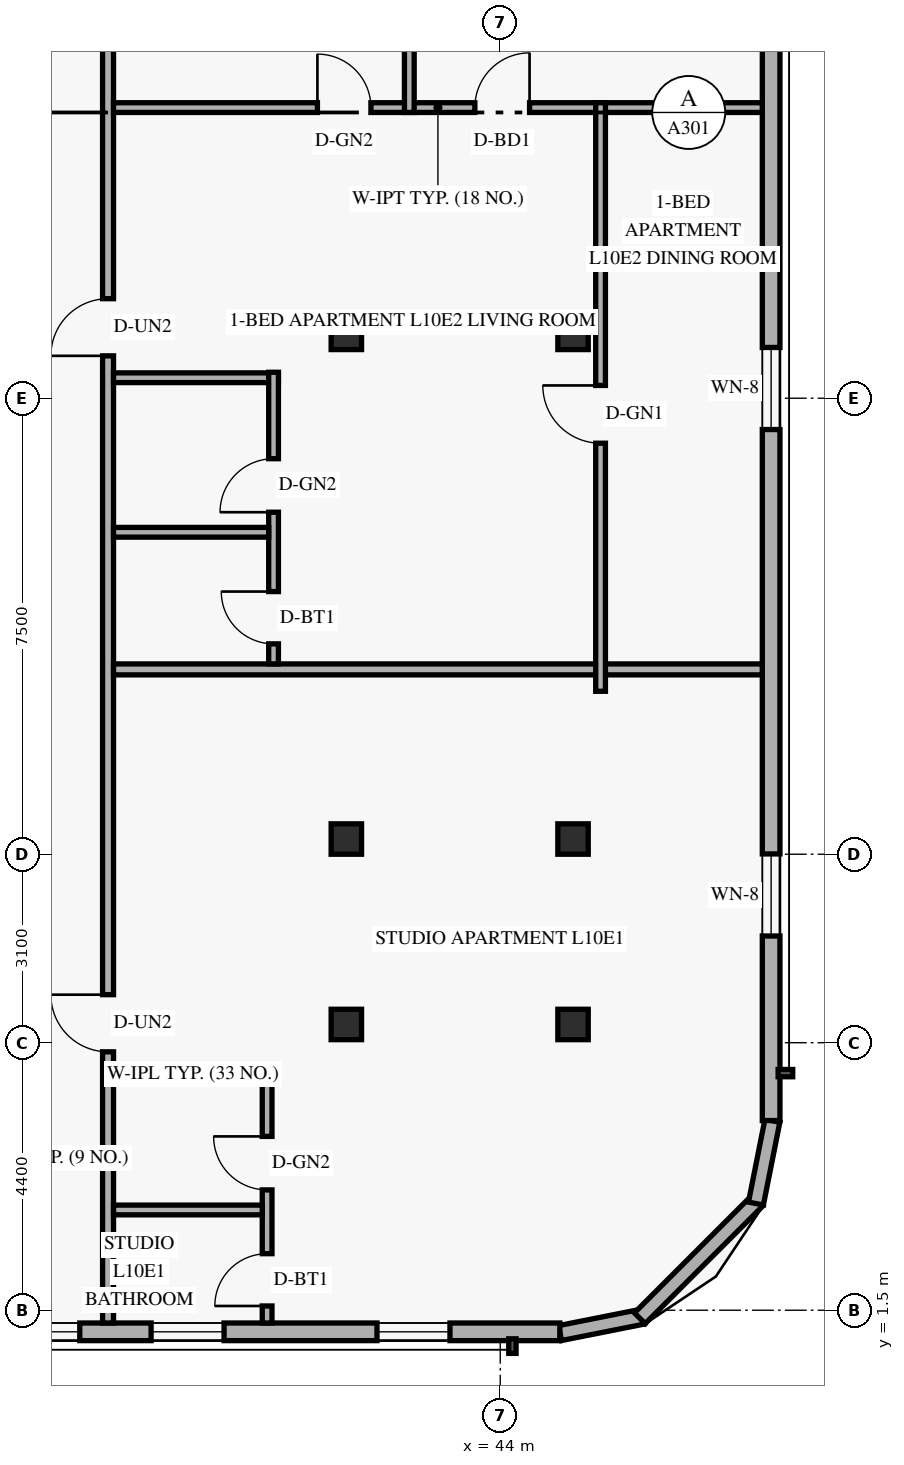
"""IFC4 building model, lengths in metres.
Left out: names, types, materials, properties, quantities, classifications, styles, units other than length and angle.
Written with IfcOpenShell. Run it as: python <this file> out.ifc"""

import sys

from ifc_helpers import new_model, si_unit, direction, frame, frame_2d, origin, origin_2d, place, context, subcontext, project, spatial, rectangle, hollow_rectangle, extrude, element, fill, save


model = new_model("IFC4")
c1 = context("Model", 3, precision=1e-05, world=origin(), true_north=direction((0.0, 1.0)))
c2 = subcontext(c1, "Body", "Model", "MODEL_VIEW")
j1 = project(units=[si_unit("LENGTHUNIT", "METRE"), si_unit("PLANEANGLEUNIT", "RADIAN")], contexts=[c1])
p1 = place(None, origin())
s1 = spatial("IfcSite", under=j1, at=p1, CompositionType="ELEMENT")
p2 = place(p1, origin())
s2 = spatial("IfcBuilding", under=s1, at=p2, CompositionType="ELEMENT")
p3 = place(p2, frame((0.0, 0.0, 42.0)))
s3 = spatial("IfcBuildingStorey", under=s2, at=p3, CompositionType="ELEMENT", Elevation=42.0)
for number, where, z_axis, x_axis in (
    (1, (41.406, 6.2, 0.0), (0.035, 0.0, 0.999), (0.0, 1.0, 0.0)),
    (2, (41.406, 9.25, 0.0), (0.035, 0.0, 0.999), (0.0, 1.0, 0.0)),
    (3, (41.406, 17.55, 0.0), (0.035, 0.0, 0.999), (0.0, 1.0, 0.0)),
):
    element("IfcColumn", number, at=place(p3, frame(where, z_axis=z_axis, x_axis=x_axis)), inside=s3, PredefinedType="COLUMN", context=c2, shape_type="SweptSolid", body=[
        extrude(hollow_rectangle(XDim=0.5, YDim=0.5, WallThickness=0.022, at=origin_2d()), origin(), (0.0, 0.0, 1.0), 3.602),
    ])
for number, where, z_axis, x_axis in (
    (4, (45.093, 6.2, 0.0), (0.058, 0.0, 0.998), (0.0, 1.0, 0.0)),
    (5, (45.093, 9.25, 0.0), (0.058, 0.0, 0.998), (0.0, 1.0, 0.0)),
    (6, (45.093, 17.55, 0.0), (0.058, 0.0, 0.998), (0.0, 1.0, 0.0)),
):
    element("IfcColumn", number, at=place(p3, frame(where, z_axis=z_axis, x_axis=x_axis)), inside=s3, PredefinedType="COLUMN", context=c2, shape_type="SweptSolid", body=[
        extrude(hollow_rectangle(XDim=0.5, YDim=0.5, WallThickness=0.022, at=origin_2d()), origin(), (0.0, 0.0, 1.0), 3.606),
    ])
p4 = place(p3, frame((44.983, 1.124, 0.0), z_axis=(0.0, 0.0, 1.0), x_axis=(0.980809899341, 0.19496651342, 0.0)))
e7 = element("IfcWall", 7, at=p4, inside=s3, PredefinedType="SOLIDWALL", context=c2, shape_type="SweptSolid", body=[
    extrude(rectangle(XDim=1.389, YDim=0.25, at=frame_2d((0.694, 0.0))), origin(), (0.0, 0.0, 1.0), 3.36),
])
p5 = place(p3, frame((46.295, 1.368, 0.0), z_axis=(0.0, 0.0, 1.0), x_axis=(0.707106781187, 0.707106781187, 0.0)))
e8 = element("IfcWall", 8, at=p5, inside=s3, PredefinedType="SOLIDWALL", context=c2, shape_type="SweptSolid", body=[
    extrude(rectangle(XDim=2.739, YDim=0.25, at=frame_2d((1.37, 0.0))), origin(), (0.0, 0.0, 1.0), 3.36),
])
p6 = place(p3, frame((48.205, 3.254, 0.0), z_axis=(0.0, 0.0, 1.0), x_axis=(0.19496651342, 0.980809899341, 0.0)))
e9 = element("IfcWall", 9, at=p6, inside=s3, PredefinedType="SOLIDWALL", context=c2, shape_type="SweptSolid", body=[
    extrude(rectangle(XDim=1.389, YDim=0.25, at=frame_2d((0.694, 0.0))), origin(), (0.0, 0.0, 1.0), 3.36),
])
p7 = place(p3, frame((5.42, 1.145, 0.0), z_axis=(0.0, 0.0, 1.0), x_axis=(1.0, 0.0, 0.0)))
e10 = element("IfcWall", 10, at=p7, inside=s3, PredefinedType="SOLIDWALL", context=c2, shape_type="SweptSolid", body=[
    extrude(rectangle(XDim=39.56, YDim=0.29, at=frame_2d((19.78, 0.0))), origin(), (0.0, 0.0, 1.0), 3.36),
])
p8 = place(p7, frame((2.84, 0.0, 0.85)))
e11 = element("IfcOpeningElement", 11, at=p8, cuts=e10, PredefinedType="OPENING", context=c2, shape_type="SweptSolid", body=[
    extrude(rectangle(XDim=1.2, YDim=1.5, at=frame_2d((0.6, 0.75))), frame((0.0, 0.155, 0.0), z_axis=(0.0, -1.0, 0.0), x_axis=(1.0, 0.0, 0.0)), (0.0, 0.0, 1.0), 0.31),
])
p9 = place(p7, frame((7.18, 0.0, 0.85)))
e12 = element("IfcOpeningElement", 12, at=p9, cuts=e10, PredefinedType="OPENING", context=c2, shape_type="SweptSolid", body=[
    extrude(rectangle(XDim=1.2, YDim=1.5, at=frame_2d((0.6, 0.75))), frame((0.0, 0.155, 0.0), z_axis=(0.0, -1.0, 0.0), x_axis=(1.0, 0.0, 0.0)), (0.0, 0.0, 1.0), 0.31),
])
p10 = place(p7, frame((12.131, 0.0, 0.85)))
e13 = element("IfcOpeningElement", 13, at=p10, cuts=e10, PredefinedType="OPENING", context=c2, shape_type="SweptSolid", body=[
    extrude(rectangle(XDim=1.2, YDim=1.5, at=frame_2d((0.6, 0.75))), frame((0.0, 0.155, 0.0), z_axis=(0.0, -1.0, 0.0), x_axis=(1.0, 0.0, 0.0)), (0.0, 0.0, 1.0), 0.31),
])
p11 = place(p7, frame((18.74, 0.0, 0.85)))
e14 = element("IfcOpeningElement", 14, at=p11, cuts=e10, PredefinedType="OPENING", context=c2, shape_type="SweptSolid", body=[
    extrude(rectangle(XDim=1.2, YDim=1.5, at=frame_2d((0.6, 0.75))), frame((0.0, 0.155, 0.0), z_axis=(0.0, -1.0, 0.0), x_axis=(1.0, 0.0, 0.0)), (0.0, 0.0, 1.0), 0.31),
])
p12 = place(p7, frame((25.349, 0.0, 0.85)))
e15 = element("IfcOpeningElement", 15, at=p12, cuts=e10, PredefinedType="OPENING", context=c2, shape_type="SweptSolid", body=[
    extrude(rectangle(XDim=1.2, YDim=1.5, at=frame_2d((0.6, 0.75))), frame((0.0, 0.155, 0.0), z_axis=(0.0, -1.0, 0.0), x_axis=(1.0, 0.0, 0.0)), (0.0, 0.0, 1.0), 0.31),
])
p13 = place(p7, frame((30.465, 0.0, 0.85)))
e16 = element("IfcOpeningElement", 16, at=p13, cuts=e10, PredefinedType="OPENING", context=c2, shape_type="SweptSolid", body=[
    extrude(rectangle(XDim=1.2, YDim=1.5, at=frame_2d((0.6, 0.75))), frame((0.0, 0.155, 0.0), z_axis=(0.0, -1.0, 0.0), x_axis=(1.0, 0.0, 0.0)), (0.0, 0.0, 1.0), 0.31),
])
p14 = place(p7, frame((32.838, 0.0, 0.85)))
e17 = element("IfcOpeningElement", 17, at=p14, cuts=e10, PredefinedType="OPENING", context=c2, shape_type="SweptSolid", body=[
    extrude(rectangle(XDim=1.2, YDim=1.5, at=frame_2d((0.6, 0.75))), frame((0.0, 0.155, 0.0), z_axis=(0.0, -1.0, 0.0), x_axis=(1.0, 0.0, 0.0)), (0.0, 0.0, 1.0), 0.31),
])
p15 = place(p7, frame((36.553, 0.0, 0.85)))
e18 = element("IfcOpeningElement", 18, at=p15, cuts=e10, PredefinedType="OPENING", context=c2, shape_type="SweptSolid", body=[
    extrude(rectangle(XDim=1.2, YDim=1.5, at=frame_2d((0.6, 0.75))), frame((0.0, 0.155, 0.0), z_axis=(0.0, -1.0, 0.0), x_axis=(1.0, 0.0, 0.0)), (0.0, 0.0, 1.0), 0.31),
])
p16 = place(p3, frame((48.455, 4.62, 0.0), z_axis=(0.0, 0.0, 1.0), x_axis=(0.0, 1.0, 0.0)))
e19 = element("IfcWall", 19, at=p16, inside=s3, PredefinedType="SOLIDWALL", context=c2, shape_type="SweptSolid", body=[
    extrude(rectangle(XDim=38.76, YDim=0.29, at=frame_2d((19.38, 0.0))), origin(), (0.0, 0.0, 1.0), 3.36),
])
p17 = place(p16, frame((3.035, 0.0, 0.85)))
e20 = element("IfcOpeningElement", 20, at=p17, cuts=e19, PredefinedType="OPENING", context=c2, shape_type="SweptSolid", body=[
    extrude(rectangle(XDim=1.35, YDim=1.55, at=frame_2d((0.675, 0.775))), frame((0.0, 0.155, 0.0), z_axis=(0.0, -1.0, 0.0), x_axis=(1.0, 0.0, 0.0)), (0.0, 0.0, 1.0), 0.31),
])
p18 = place(p16, frame((11.365, 0.0, 0.85)))
e21 = element("IfcOpeningElement", 21, at=p18, cuts=e19, PredefinedType="OPENING", context=c2, shape_type="SweptSolid", body=[
    extrude(rectangle(XDim=1.35, YDim=1.55, at=frame_2d((0.675, 0.775))), frame((0.0, 0.155, 0.0), z_axis=(0.0, -1.0, 0.0), x_axis=(1.0, 0.0, 0.0)), (0.0, 0.0, 1.0), 0.31),
])
p19 = place(p16, frame((17.805, 0.0, 0.85)))
e22 = element("IfcOpeningElement", 22, at=p19, cuts=e19, PredefinedType="OPENING", context=c2, shape_type="SweptSolid", body=[
    extrude(rectangle(XDim=1.35, YDim=1.55, at=frame_2d((0.675, 0.775))), frame((0.0, 0.155, 0.0), z_axis=(0.0, -1.0, 0.0), x_axis=(1.0, 0.0, 0.0)), (0.0, 0.0, 1.0), 0.31),
])
p20 = place(p16, frame((23.61, 0.0, 0.85)))
e23 = element("IfcOpeningElement", 23, at=p20, cuts=e19, PredefinedType="OPENING", context=c2, shape_type="SweptSolid", body=[
    extrude(rectangle(XDim=1.35, YDim=1.55, at=frame_2d((0.675, 0.775))), frame((0.0, 0.155, 0.0), z_axis=(0.0, -1.0, 0.0), x_axis=(1.0, 0.0, 0.0)), (0.0, 0.0, 1.0), 0.31),
])
p21 = place(p16, frame((29.59, 0.0, 0.85)))
e24 = element("IfcOpeningElement", 24, at=p21, cuts=e19, PredefinedType="OPENING", context=c2, shape_type="SweptSolid", body=[
    extrude(rectangle(XDim=1.35, YDim=1.55, at=frame_2d((0.675, 0.775))), frame((0.0, 0.155, 0.0), z_axis=(0.0, -1.0, 0.0), x_axis=(1.0, 0.0, 0.0)), (0.0, 0.0, 1.0), 0.31),
])
p22 = place(p16, frame((34.835, 0.0, 0.85)))
e25 = element("IfcOpeningElement", 25, at=p22, cuts=e19, PredefinedType="OPENING", context=c2, shape_type="SweptSolid", body=[
    extrude(rectangle(XDim=1.35, YDim=1.55, at=frame_2d((0.675, 0.775))), frame((0.0, 0.155, 0.0), z_axis=(0.0, -1.0, 0.0), x_axis=(1.0, 0.0, 0.0)), (0.0, 0.0, 1.0), 0.31),
])
p23 = place(p3, frame((37.55, 1.29, 0.0), z_axis=(0.0, 0.0, 1.0), x_axis=(0.0, 1.0, 0.0)))
e26 = element("IfcWall", 26, at=p23, inside=s3, PredefinedType="STANDARD", context=c2, shape_type="SweptSolid", body=[
    extrude(rectangle(XDim=45.42, YDim=0.18, at=frame_2d((22.71, 0.0))), origin(), (0.0, 0.0, 1.0), 2.649),
])
p24 = place(p23, frame((4.46, 0.0, 0.0)))
e27 = element("IfcOpeningElement", 27, at=p24, cuts=e26, PredefinedType="OPENING", context=c2, shape_type="SweptSolid", body=[
    extrude(rectangle(XDim=0.94, YDim=2.15, at=frame_2d((0.47, 1.075))), frame((0.0, 0.1, 0.0), z_axis=(0.0, -1.0, 0.0), x_axis=(1.0, 0.0, 0.0)), (0.0, 0.0, 1.0), 0.2),
])
p25 = place(p23, frame((15.907, 0.0, 0.0)))
e28 = element("IfcOpeningElement", 28, at=p25, cuts=e26, PredefinedType="OPENING", context=c2, shape_type="SweptSolid", body=[
    extrude(rectangle(XDim=0.94, YDim=2.15, at=frame_2d((0.47, 1.075))), frame((0.0, 0.1, 0.0), z_axis=(0.0, -1.0, 0.0), x_axis=(1.0, 0.0, 0.0)), (0.0, 0.0, 1.0), 0.2),
])
p26 = place(p23, frame((28.23, 0.0, 0.0)))
e29 = element("IfcOpeningElement", 29, at=p26, cuts=e26, PredefinedType="OPENING", context=c2, shape_type="SweptSolid", body=[
    extrude(rectangle(XDim=0.94, YDim=2.15, at=frame_2d((0.47, 1.075))), frame((0.0, 0.1, 0.0), z_axis=(0.0, -1.0, 0.0), x_axis=(1.0, 0.0, 0.0)), (0.0, 0.0, 1.0), 0.2),
])
p27 = place(p23, frame((40.02, 0.0, 0.0)))
e30 = element("IfcOpeningElement", 30, at=p27, cuts=e26, PredefinedType="OPENING", context=c2, shape_type="SweptSolid", body=[
    extrude(rectangle(XDim=0.94, YDim=2.15, at=frame_2d((0.47, 1.075))), frame((0.0, 0.1, 0.0), z_axis=(0.0, -1.0, 0.0), x_axis=(1.0, 0.0, 0.0)), (0.0, 0.0, 1.0), 0.2),
])
p28 = place(p3, frame((37.64, 5.39, 0.0), z_axis=(0.0, 0.0, 1.0), x_axis=(1.0, 0.0, 0.0)))
e31 = element("IfcWall", 31, at=p28, inside=s3, PredefinedType="PLUMBINGWALL", context=c2, shape_type="SweptSolid", body=[
    extrude(rectangle(XDim=2.606, YDim=0.16, at=frame_2d((1.303, 0.0))), origin(), (0.0, 0.0, 1.0), 3.36),
])
p29 = place(p3, frame((40.166, 1.29, 0.0), z_axis=(0.0, 0.0, 1.0), x_axis=(0.0, 1.0, 0.0)))
e32 = element("IfcWall", 32, at=p29, inside=s3, PredefinedType="PLUMBINGWALL", context=c2, shape_type="SweptSolid", body=[
    extrude(rectangle(XDim=4.19, YDim=0.16, at=frame_2d((2.095, 0.0))), origin(), (0.0, 0.0, 1.0), 3.36),
])
p30 = place(p29, frame((0.28, 0.0, 0.0)))
e33 = element("IfcOpeningElement", 33, at=p30, cuts=e32, PredefinedType="OPENING", context=c2, shape_type="SweptSolid", body=[
    extrude(rectangle(XDim=0.86, YDim=2.12, at=frame_2d((0.43, 1.06))), frame((0.0, 0.09, 0.0), z_axis=(0.0, -1.0, 0.0), x_axis=(1.0, 0.0, 0.0)), (0.0, 0.0, 1.0), 0.18),
])
p31 = place(p29, frame((2.189, 0.0, 0.0)))
e34 = element("IfcOpeningElement", 34, at=p31, cuts=e32, PredefinedType="OPENING", context=c2, shape_type="SweptSolid", body=[
    extrude(rectangle(XDim=0.88, YDim=2.12, at=frame_2d((0.44, 1.06))), frame((0.0, 0.09, 0.0), z_axis=(0.0, -1.0, 0.0), x_axis=(1.0, 0.0, 0.0)), (0.0, 0.0, 1.0), 0.18),
])
p32 = place(p3, frame((37.64, 3.149, 0.0), z_axis=(0.0, 0.0, 1.0), x_axis=(1.0, 0.0, 0.0)))
e35 = element("IfcWall", 35, at=p32, inside=s3, PredefinedType="PLUMBINGWALL", context=c2, shape_type="SweptSolid", body=[
    extrude(rectangle(XDim=2.446, YDim=0.16, at=frame_2d((1.223, 0.0))), origin(), (0.0, 0.0, 1.0), 3.36),
])
p33 = place(p3, frame((37.64, 12.04, 0.0), z_axis=(0.0, 0.0, 1.0), x_axis=(1.0, 0.0, 0.0)))
e36 = element("IfcWall", 36, at=p33, inside=s3, PredefinedType="PARTITIONING", context=c2, shape_type="SweptSolid", body=[
    extrude(rectangle(XDim=10.67, YDim=0.18, at=frame_2d((5.335, 0.0))), origin(), (0.0, 0.0, 1.0), 2.649),
])
p34 = place(p3, frame((37.64, 21.28, 0.0), z_axis=(0.0, 0.0, 1.0), x_axis=(1.0, 0.0, 0.0)))
e37 = element("IfcWall", 37, at=p34, inside=s3, PredefinedType="PARTITIONING", context=c2, shape_type="SweptSolid", body=[
    extrude(rectangle(XDim=10.67, YDim=0.16, at=frame_2d((5.335, 0.0))), origin(), (0.0, 0.0, 1.0), 2.649),
])
p35 = place(p34, frame((3.353, 0.0, 0.0)))
e38 = element("IfcOpeningElement", 38, at=p35, cuts=e37, PredefinedType="OPENING", context=c2, shape_type="SweptSolid", body=[
    extrude(rectangle(XDim=0.88, YDim=2.12, at=frame_2d((0.44, 1.06))), frame((0.0, 0.09, 0.0), z_axis=(0.0, -1.0, 0.0), x_axis=(1.0, 0.0, 0.0)), (0.0, 0.0, 1.0), 0.18),
])
p36 = place(p34, frame((5.942, 0.0, 0.0)))
e39 = element("IfcOpeningElement", 39, at=p36, cuts=e37, PredefinedType="OPENING", context=c2, shape_type="SweptSolid", body=[
    extrude(rectangle(XDim=0.9, YDim=2.14, at=frame_2d((0.45, 1.07))), frame((0.0, 0.09, 0.0), z_axis=(0.0, -1.0, 0.0), x_axis=(1.0, 0.0, 0.0)), (0.0, 0.0, 1.0), 0.18),
])
p37 = place(p3, frame((37.64, 16.837, 0.0), z_axis=(0.0, 0.0, 1.0), x_axis=(1.0, 0.0, 0.0)))
e40 = element("IfcWall", 40, at=p37, inside=s3, PredefinedType="PLUMBINGWALL", context=c2, shape_type="SweptSolid", body=[
    extrude(rectangle(XDim=2.712, YDim=0.16, at=frame_2d((1.356, 0.0))), origin(), (0.0, 0.0, 1.0), 3.36),
])
p38 = place(p3, frame((40.272, 12.13, 0.0), z_axis=(0.0, 0.0, 1.0), x_axis=(0.0, 1.0, 0.0)))
e41 = element("IfcWall", 41, at=p38, inside=s3, PredefinedType="PLUMBINGWALL", context=c2, shape_type="SweptSolid", body=[
    extrude(rectangle(XDim=4.797, YDim=0.16, at=frame_2d((2.398, 0.0))), origin(), (0.0, 0.0, 1.0), 2.932),
])
p39 = place(p38, frame((0.33, 0.0, 0.0)))
e42 = element("IfcOpeningElement", 42, at=p39, cuts=e41, PredefinedType="OPENING", context=c2, shape_type="SweptSolid", body=[
    extrude(rectangle(XDim=0.86, YDim=2.12, at=frame_2d((0.43, 1.06))), frame((0.0, 0.09, 0.0), z_axis=(0.0, -1.0, 0.0), x_axis=(1.0, 0.0, 0.0)), (0.0, 0.0, 1.0), 0.18),
])
p40 = place(p38, frame((2.495, 0.0, 0.0)))
e43 = element("IfcOpeningElement", 43, at=p40, cuts=e41, PredefinedType="OPENING", context=c2, shape_type="SweptSolid", body=[
    extrude(rectangle(XDim=0.88, YDim=2.12, at=frame_2d((0.44, 1.06))), frame((0.0, 0.09, 0.0), z_axis=(0.0, -1.0, 0.0), x_axis=(1.0, 0.0, 0.0)), (0.0, 0.0, 1.0), 0.18),
])
p41 = place(p3, frame((37.64, 14.295, 0.0), z_axis=(0.0, 0.0, 1.0), x_axis=(1.0, 0.0, 0.0)))
e44 = element("IfcWall", 44, at=p41, inside=s3, PredefinedType="PLUMBINGWALL", context=c2, shape_type="SweptSolid", body=[
    extrude(rectangle(XDim=2.552, YDim=0.16, at=frame_2d((1.276, 0.0))), origin(), (0.0, 0.0, 1.0), 3.36),
])
p42 = place(p3, frame((45.65, 11.68, 0.0), z_axis=(0.0, 0.0, 1.0), x_axis=(0.0, 1.0, 0.0)))
e45 = element("IfcWall", 45, at=p42, inside=s3, PredefinedType="PARTITIONING", context=c2, shape_type="SweptSolid", body=[
    extrude(rectangle(XDim=9.68, YDim=0.16, at=frame_2d((4.84, 0.0))), origin(), (0.0, 0.0, 1.0), 3.36),
])
p43 = place(p42, frame((4.08, 0.0, 0.0)))
e46 = element("IfcOpeningElement", 46, at=p43, cuts=e45, PredefinedType="OPENING", context=c2, shape_type="SweptSolid", body=[
    extrude(rectangle(XDim=0.95, YDim=2.15, at=frame_2d((0.475, 1.075))), frame((0.0, 0.09, 0.0), z_axis=(0.0, -1.0, 0.0), x_axis=(1.0, 0.0, 0.0)), (0.0, 0.0, 1.0), 0.18),
])
p44 = place(p3, frame((42.504, 21.2, 0.0), z_axis=(0.0, 0.0, 1.0), x_axis=(0.0, 1.0, 0.0)))
e47 = element("IfcWall", 47, at=p44, inside=s3, PredefinedType="PARTITIONING", context=c2, shape_type="SweptSolid", body=[
    extrude(rectangle(XDim=4.11, YDim=0.16, at=frame_2d((2.055, 0.0))), origin(), (0.0, 0.0, 1.0), 2.932),
])
p45 = place(p13, origin())
e48 = element("IfcWindow", 48, at=p45, inside=s3, PartitioningType="SINGLE_PANEL", PredefinedType="WINDOW", context=c2, shape_type="SweptSolid", body=[
    extrude(rectangle(XDim=1.2, YDim=1.5, at=frame_2d((0.6, 0.75))), frame((0.0, 0.03, 0.0), z_axis=(0.0, -1.0, 0.0), x_axis=(1.0, 0.0, 0.0)), (0.0, 0.0, 1.0), 0.06),
])
fill(e16, e48)
p46 = place(p14, origin())
e49 = element("IfcWindow", 49, at=p46, inside=s3, PartitioningType="SINGLE_PANEL", PredefinedType="WINDOW", context=c2, shape_type="SweptSolid", body=[
    extrude(rectangle(XDim=1.2, YDim=1.5, at=frame_2d((0.6, 0.75))), frame((0.0, 0.03, 0.0), z_axis=(0.0, -1.0, 0.0), x_axis=(1.0, 0.0, 0.0)), (0.0, 0.0, 1.0), 0.06),
])
fill(e17, e49)
p47 = place(p15, origin())
e50 = element("IfcWindow", 50, at=p47, inside=s3, PartitioningType="SINGLE_PANEL", PredefinedType="WINDOW", context=c2, shape_type="SweptSolid", body=[
    extrude(rectangle(XDim=1.2, YDim=1.5, at=frame_2d((0.6, 0.75))), frame((0.0, 0.03, 0.0), z_axis=(0.0, -1.0, 0.0), x_axis=(1.0, 0.0, 0.0)), (0.0, 0.0, 1.0), 0.06),
])
fill(e18, e50)
p48 = place(p17, origin())
e51 = element("IfcWindow", 51, at=p48, inside=s3, PartitioningType="SINGLE_PANEL", PredefinedType="WINDOW", context=c2, shape_type="SweptSolid", body=[
    extrude(rectangle(XDim=1.35, YDim=1.55, at=frame_2d((0.675, 0.775))), frame((0.0, 0.03, 0.0), z_axis=(0.0, -1.0, 0.0), x_axis=(1.0, 0.0, 0.0)), (0.0, 0.0, 1.0), 0.06),
])
fill(e20, e51)
p49 = place(p18, origin())
e52 = element("IfcWindow", 52, at=p49, inside=s3, PartitioningType="SINGLE_PANEL", PredefinedType="WINDOW", context=c2, shape_type="SweptSolid", body=[
    extrude(rectangle(XDim=1.35, YDim=1.55, at=frame_2d((0.675, 0.775))), frame((0.0, 0.03, 0.0), z_axis=(0.0, -1.0, 0.0), x_axis=(1.0, 0.0, 0.0)), (0.0, 0.0, 1.0), 0.06),
])
fill(e21, e52)
p50 = place(p24, origin())
e53 = element("IfcDoor", 53, at=p50, inside=s3, OperationType="SINGLE_SWING_RIGHT", PredefinedType="DOOR", context=c2, shape_type="SweptSolid", body=[
    extrude(rectangle(XDim=0.94, YDim=2.15, at=frame_2d((0.47, 1.075))), frame((0.0, 0.025, 0.0), z_axis=(0.0, -1.0, 0.0), x_axis=(1.0, 0.0, 0.0)), (0.0, 0.0, 1.0), 0.05),
])
fill(e27, e53)
p51 = place(p30, origin())
e54 = element("IfcDoor", 54, at=p51, inside=s3, OperationType="SINGLE_SWING_LEFT", PredefinedType="DOOR", context=c2, shape_type="SweptSolid", body=[
    extrude(rectangle(XDim=0.86, YDim=2.12, at=frame_2d((0.43, 1.06))), frame((0.0, 0.025, 0.0), z_axis=(0.0, -1.0, 0.0), x_axis=(1.0, 0.0, 0.0)), (0.0, 0.0, 1.0), 0.05),
])
fill(e33, e54)
p52 = place(p31, origin())
e55 = element("IfcDoor", 55, at=p52, inside=s3, OperationType="SINGLE_SWING_RIGHT", PredefinedType="DOOR", context=c2, shape_type="SweptSolid", body=[
    extrude(rectangle(XDim=0.88, YDim=2.12, at=frame_2d((0.44, 1.06))), frame((0.0, 0.025, 0.0), z_axis=(0.0, -1.0, 0.0), x_axis=(1.0, 0.0, 0.0)), (0.0, 0.0, 1.0), 0.05),
])
fill(e34, e55)
p53 = place(p43, origin())
e56 = element("IfcDoor", 56, at=p53, inside=s3, OperationType="SINGLE_SWING_RIGHT", PredefinedType="DOOR", context=c2, shape_type="SweptSolid", body=[
    extrude(rectangle(XDim=0.95, YDim=2.15, at=frame_2d((0.475, 1.075))), frame((0.0, 0.025, 0.0), z_axis=(0.0, -1.0, 0.0), x_axis=(1.0, 0.0, 0.0)), (0.0, 0.0, 1.0), 0.05),
])
fill(e46, e56)
p54 = place(p25, origin())
e57 = element("IfcDoor", 57, at=p54, inside=s3, OperationType="SINGLE_SWING_LEFT", PredefinedType="DOOR", context=c2, shape_type="SweptSolid", body=[
    extrude(rectangle(XDim=0.94, YDim=2.15, at=frame_2d((0.47, 1.075))), frame((0.0, 0.025, 0.0), z_axis=(0.0, -1.0, 0.0), x_axis=(1.0, 0.0, 0.0)), (0.0, 0.0, 1.0), 0.05),
])
fill(e28, e57)
p55 = place(p39, origin())
e58 = element("IfcDoor", 58, at=p55, inside=s3, OperationType="SINGLE_SWING_RIGHT", PredefinedType="DOOR", context=c2, shape_type="SweptSolid", body=[
    extrude(rectangle(XDim=0.86, YDim=2.12, at=frame_2d((0.43, 1.06))), frame((0.0, 0.025, 0.0), z_axis=(0.0, -1.0, 0.0), x_axis=(1.0, 0.0, 0.0)), (0.0, 0.0, 1.0), 0.05),
])
fill(e42, e58)
p56 = place(p40, origin())
e59 = element("IfcDoor", 59, at=p56, inside=s3, OperationType="SINGLE_SWING_LEFT", PredefinedType="DOOR", context=c2, shape_type="SweptSolid", body=[
    extrude(rectangle(XDim=0.88, YDim=2.12, at=frame_2d((0.44, 1.06))), frame((0.0, 0.025, 0.0), z_axis=(0.0, -1.0, 0.0), x_axis=(1.0, 0.0, 0.0)), (0.0, 0.0, 1.0), 0.05),
])
fill(e43, e59)
p57 = place(p35, origin())
e60 = element("IfcDoor", 60, at=p57, inside=s3, OperationType="SINGLE_SWING_LEFT", PredefinedType="DOOR", context=c2, shape_type="SweptSolid", body=[
    extrude(rectangle(XDim=0.88, YDim=2.12, at=frame_2d((0.44, 1.06))), frame((0.0, 0.025, 0.0), z_axis=(0.0, -1.0, 0.0), x_axis=(1.0, 0.0, 0.0)), (0.0, 0.0, 1.0), 0.05),
])
fill(e38, e60)
p58 = place(p36, origin())
e61 = element("IfcDoor", 61, at=p58, inside=s3, OperationType="SINGLE_SWING_RIGHT", PredefinedType="DOOR", context=c2, shape_type="SweptSolid", body=[
    extrude(rectangle(XDim=0.9, YDim=2.14, at=frame_2d((0.45, 1.07))), frame((0.0, 0.025, 0.0), z_axis=(0.0, -1.0, 0.0), x_axis=(1.0, 0.0, 0.0)), (0.0, 0.0, 1.0), 0.05),
])
fill(e39, e61)
save(model, sys.argv[1])
